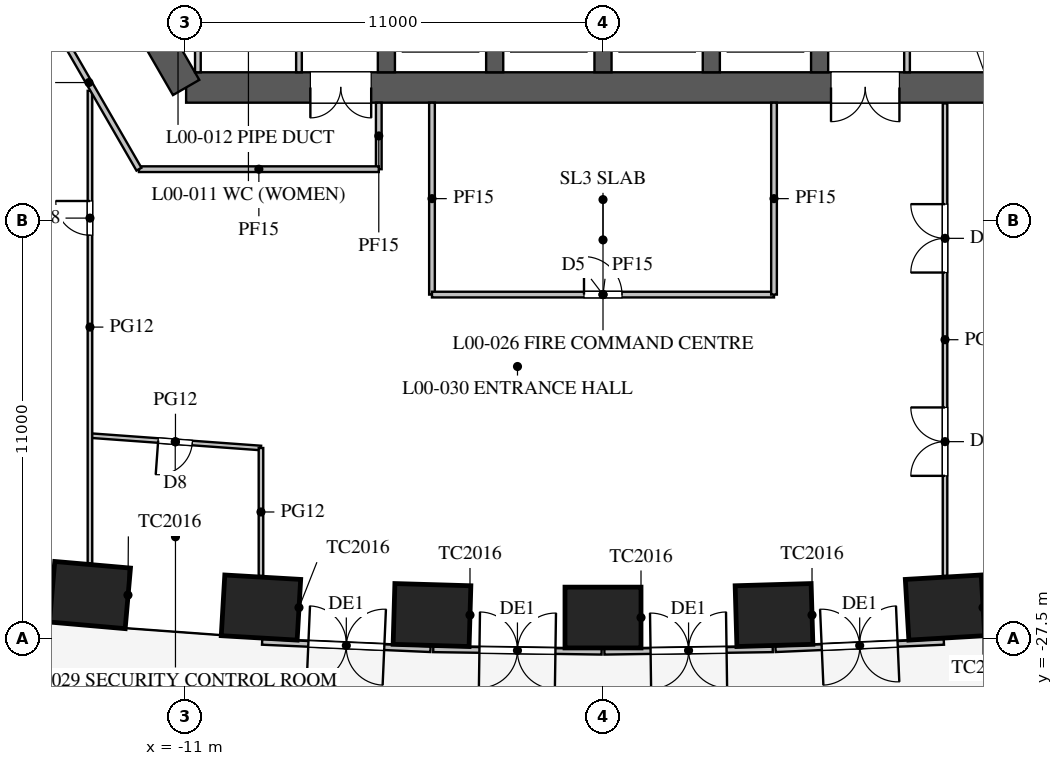
"""IFC4 building model, lengths in metres.
Left out: names, types, materials, properties, quantities, classifications, styles, units other than length and angle.
Written with IfcOpenShell. Run it as: python <this file> out.ifc"""

import sys

from ifc_helpers import new_model, si_unit, direction, frame, frame_2d, origin, origin_2d, place, context, subcontext, project, spatial, rectangle, extrude, element, fill, save


model = new_model("IFC4")
c1 = context("Model", 3, precision=1e-05, world=origin(), true_north=direction((0.0, 1.0)))
c2 = subcontext(c1, "Body", "Model", "MODEL_VIEW")
j1 = project(units=[si_unit("LENGTHUNIT", "METRE"), si_unit("PLANEANGLEUNIT", "RADIAN")], contexts=[c1])
p1 = place(None, origin())
s1 = spatial("IfcSite", under=j1, at=p1, CompositionType="ELEMENT")
p2 = place(p1, origin())
s2 = spatial("IfcBuilding", under=s1, at=p2, CompositionType="ELEMENT")
p3 = place(p2, origin())
s3 = spatial("IfcBuildingStorey", under=s2, at=p3, CompositionType="ELEMENT", Elevation=0.0)
for number, where, z_axis, x_axis in (
    (1, (-13.5, -26.357, 0.0), (0.0, 0.0, 1.0), (0.996, -0.087, 0.0)),
    (2, (-9.0, -26.686, 0.0), (0.0, 0.0, 1.0), (0.998, -0.058, 0.0)),
    (3, (-4.5, -26.883, 0.0), (0.0, 0.0, 1.0), (1.0, -0.029, 0.0)),
    (4, (0.0, -26.949, 0.0), (0.0, 0.0, 1.0), (1.0, 0.0, 0.0)),
    (5, (4.5, -26.883, 0.0), (0.0, 0.0, 1.0), (1.0, 0.029, 0.0)),
    (6, (9.0, -26.686, 0.0), (0.0, 0.0, 1.0), (0.998, 0.058, 0.0)),
):
    element("IfcColumn", number, at=place(p3, frame(where, z_axis=z_axis, x_axis=x_axis)), inside=s3, PredefinedType="COLUMN", context=c2, shape_type="SweptSolid", body=[
        extrude(rectangle(XDim=2.0, YDim=1.6, at=origin_2d()), origin(), (0.0, 0.0, 1.0), 6.5),
    ])
p4 = place(p3, frame((-10.97, -13.0, 0.0), z_axis=(0.0, 0.0, 1.0), x_axis=(1.0, 0.0, 0.0)))
e7 = element("IfcWall", 7, at=p4, inside=s3, PredefinedType="SHEAR", context=c2, shape_type="SweptSolid", body=[
    extrude(rectangle(XDim=21.939, YDim=0.8, at=frame_2d((10.97, 0.0))), origin(), (0.0, 0.0, 1.0), 6.5),
])
p5 = place(p4, frame((16.97, 0.0, 0.0)))
e8 = element("IfcOpeningElement", 8, at=p5, cuts=e7, PredefinedType="OPENING", context=c2, shape_type="SweptSolid", body=[
    extrude(rectangle(XDim=1.8, YDim=2.1, at=frame_2d((0.9, 1.05))), frame((0.0, 0.41, 0.0), z_axis=(0.0, -1.0, 0.0), x_axis=(1.0, 0.0, 0.0)), (0.0, 0.0, 1.0), 0.82),
])
p6 = place(p4, frame((3.27, 0.0, 0.0)))
e9 = element("IfcOpeningElement", 9, at=p6, cuts=e7, PredefinedType="OPENING", context=c2, shape_type="SweptSolid", body=[
    extrude(rectangle(XDim=1.6, YDim=2.1, at=frame_2d((0.8, 1.05))), frame((0.0, 0.41, 0.0), z_axis=(0.0, -1.0, 0.0), x_axis=(1.0, 0.0, 0.0)), (0.0, 0.0, 1.0), 0.82),
])
p7 = place(p3, frame((-16.743, -3.0, 0.0), z_axis=(0.0, 0.0, 1.0), x_axis=(0.499995765644, -0.866027848477, 0.0)))
e10 = element("IfcWall", 10, at=p7, inside=s3, PredefinedType="SHEAR", context=c2, shape_type="SweptSolid", body=[
    extrude(rectangle(XDim=11.547, YDim=0.8, at=frame_2d((5.773, 0.0))), origin(), (0.0, 0.0, 1.0), 6.5),
])
for number, where, z_axis, x_axis in (
    (11, (-5.7, -10.025, 0.0), (0.0, 0.0, 1.0), (0.0, -1.0, 0.0)),
    (12, (-2.85, -10.025, 0.0), (0.0, 0.0, 1.0), (0.0, -1.0, 0.0)),
    (13, (0.0, -10.025, 0.0), (0.0, 0.0, 1.0), (0.0, -1.0, 0.0)),
    (14, (2.85, -10.025, 0.0), (0.0, 0.0, 1.0), (0.0, -1.0, 0.0)),
    (15, (5.7, -10.025, 0.0), (0.0, 0.0, 1.0), (0.0, -1.0, 0.0)),
):
    element("IfcWall", number, at=place(p3, frame(where, z_axis=z_axis, x_axis=x_axis)), inside=s3, PredefinedType="SHEAR", context=c2, shape_type="SweptSolid", body=[
        extrude(rectangle(XDim=2.575, YDim=0.45, at=frame_2d((1.288, 0.0))), origin(), (0.0, 0.0, 1.0), 6.5),
    ])
p8 = place(p3, frame((-8.969, -27.589, 0.0), z_axis=(0.0, 0.0, 1.0), x_axis=(0.999053663589, -0.043494565978, 0.0)))
e16 = element("IfcWall", 16, at=p8, inside=s3, PredefinedType="SOLIDWALL", context=c2, shape_type="SweptSolid", body=[
    extrude(rectangle(XDim=4.434, YDim=0.15, at=frame_2d((2.217, 0.0))), origin(), (0.0, 0.0, 1.0), 6.48),
])
p9 = place(p8, frame((1.217, 0.0, 0.0)))
e17 = element("IfcOpeningElement", 17, at=p9, cuts=e16, PredefinedType="OPENING", context=c2, shape_type="SweptSolid", body=[
    extrude(rectangle(XDim=2.0, YDim=3.0, at=frame_2d((1.0, 1.5))), frame((0.0, 0.085, 0.0), z_axis=(0.0, -1.0, 0.0), x_axis=(1.0, 0.0, 0.0)), (0.0, 0.0, 1.0), 0.17),
])
p10 = place(p3, frame((-4.467, -27.784, 0.0), z_axis=(0.0, 0.0, 1.0), x_axis=(0.999894985015, -0.014492030258, 0.0)))
e18 = element("IfcWall", 18, at=p10, inside=s3, PredefinedType="SOLIDWALL", context=c2, shape_type="SweptSolid", body=[
    extrude(rectangle(XDim=4.431, YDim=0.15, at=frame_2d((2.215, 0.0))), origin(), (0.0, 0.0, 1.0), 6.48),
])
p11 = place(p10, frame((1.215, 0.0, 0.0)))
e19 = element("IfcOpeningElement", 19, at=p11, cuts=e18, PredefinedType="OPENING", context=c2, shape_type="SweptSolid", body=[
    extrude(rectangle(XDim=2.0, YDim=3.0, at=frame_2d((1.0, 1.5))), frame((0.0, 0.085, 0.0), z_axis=(0.0, -1.0, 0.0), x_axis=(1.0, 0.0, 0.0)), (0.0, 0.0, 1.0), 0.17),
])
p12 = place(p3, frame((0.036, -27.848, 0.0), z_axis=(0.0, 0.0, 1.0), x_axis=(0.999894985015, 0.014492030258, 0.0)))
e20 = element("IfcWall", 20, at=p12, inside=s3, PredefinedType="SOLIDWALL", context=c2, shape_type="SweptSolid", body=[
    extrude(rectangle(XDim=4.431, YDim=0.15, at=frame_2d((2.215, 0.0))), origin(), (0.0, 0.0, 1.0), 6.48),
])
p13 = place(p12, frame((1.215, 0.0, 0.0)))
e21 = element("IfcOpeningElement", 21, at=p13, cuts=e20, PredefinedType="OPENING", context=c2, shape_type="SweptSolid", body=[
    extrude(rectangle(XDim=2.0, YDim=3.0, at=frame_2d((1.0, 1.5))), frame((0.0, 0.085, 0.0), z_axis=(0.0, -1.0, 0.0), x_axis=(1.0, 0.0, 0.0)), (0.0, 0.0, 1.0), 0.17),
])
p14 = place(p3, frame((4.539, -27.782, 0.0), z_axis=(0.0, 0.0, 1.0), x_axis=(0.999053663589, 0.043494565978, 0.0)))
e22 = element("IfcWall", 22, at=p14, inside=s3, PredefinedType="SOLIDWALL", context=c2, shape_type="SweptSolid", body=[
    extrude(rectangle(XDim=4.434, YDim=0.15, at=frame_2d((2.217, 0.0))), origin(), (0.0, 0.0, 1.0), 6.48),
])
p15 = place(p14, frame((1.217, 0.0, 0.0)))
e23 = element("IfcOpeningElement", 23, at=p15, cuts=e22, PredefinedType="OPENING", context=c2, shape_type="SweptSolid", body=[
    extrude(rectangle(XDim=2.0, YDim=3.0, at=frame_2d((1.0, 1.5))), frame((0.0, 0.085, 0.0), z_axis=(0.0, -1.0, 0.0), x_axis=(1.0, 0.0, 0.0)), (0.0, 0.0, 1.0), 0.17),
])
p16 = place(p3, frame((8.0, -7.5, 0.0), z_axis=(0.0, 0.0, 1.0), x_axis=(0.0, -1.0, 0.0)))
e24 = element("IfcWall", 24, at=p16, inside=s3, PredefinedType="PARTITIONING", context=c2, shape_type="SweptSolid", body=[
    extrude(rectangle(XDim=5.1, YDim=0.15, at=frame_2d((2.55, 0.0))), origin(), (0.0, 0.0, 1.0), 6.3),
])
p17 = place(p16, frame((1.3, 0.0, 0.0)))
e25 = element("IfcOpeningElement", 25, at=p17, cuts=e24, PredefinedType="OPENING", context=c2, shape_type="SweptSolid", body=[
    extrude(rectangle(XDim=0.9, YDim=2.1, at=frame_2d((0.45, 1.05))), frame((0.0, 0.085, 0.0), z_axis=(0.0, -1.0, 0.0), x_axis=(1.0, 0.0, 0.0)), (0.0, 0.0, 1.0), 0.17),
])
p18 = place(p3, frame((-8.0, -7.5, 0.0), z_axis=(0.0, 0.0, 1.0), x_axis=(0.0, -1.0, 0.0)))
e26 = element("IfcWall", 26, at=p18, inside=s3, PredefinedType="PARTITIONING", context=c2, shape_type="SweptSolid", body=[
    extrude(rectangle(XDim=5.1, YDim=0.15, at=frame_2d((2.55, 0.0))), origin(), (0.0, 0.0, 1.0), 6.3),
])
p19 = place(p18, frame((2.6, 0.0, 0.0)))
e27 = element("IfcOpeningElement", 27, at=p19, cuts=e26, PredefinedType="OPENING", context=c2, shape_type="SweptSolid", body=[
    extrude(rectangle(XDim=0.9, YDim=2.1, at=frame_2d((0.45, 1.05))), frame((0.0, 0.085, 0.0), z_axis=(0.0, -1.0, 0.0), x_axis=(1.0, 0.0, 0.0)), (0.0, 0.0, 1.0), 0.17),
])
p20 = place(p3, frame((-10.66, -8.5, 0.0), z_axis=(0.0, 0.0, 1.0), x_axis=(0.0, -1.0, 0.0)))
e28 = element("IfcWall", 28, at=p20, inside=s3, PredefinedType="PARTITIONING", context=c2, shape_type="SweptSolid", body=[
    extrude(rectangle(XDim=4.1, YDim=0.15, at=frame_2d((2.05, 0.0))), origin(), (0.0, 0.0, 1.0), 6.3),
])
p21 = place(p3, frame((-14.203, -8.2, 0.0), z_axis=(0.0, 0.0, 1.0), x_axis=(-0.866024965723, -0.500000758745, 0.0)))
e29 = element("IfcWall", 29, at=p21, inside=s3, PredefinedType="PARTITIONING", context=c2, shape_type="SweptSolid", body=[
    extrude(rectangle(XDim=18.25, YDim=0.15, at=frame_2d((9.125, 0.0))), origin(), (0.0, 0.0, 1.0), 4.6),
])
p22 = place(p3, frame((-13.5, -22.16, 0.0), z_axis=(0.0, 0.0, 1.0), x_axis=(0.997363894896, -0.072562119306, 0.0)))
e30 = element("IfcWall", 30, at=p22, inside=s3, PredefinedType="PARTITIONING", context=c2, shape_type="SweptSolid", body=[
    extrude(rectangle(XDim=4.512, YDim=0.12, at=frame_2d((2.256, 0.0))), origin(), (0.0, 0.0, 1.0), 5.0),
])
p23 = place(p22, frame((1.8, 0.0, 0.0)))
e31 = element("IfcOpeningElement", 31, at=p23, cuts=e30, PredefinedType="OPENING", context=c2, shape_type="SweptSolid", body=[
    extrude(rectangle(XDim=0.9, YDim=2.1, at=frame_2d((0.45, 1.05))), frame((0.0, 0.07, 0.0), z_axis=(0.0, -1.0, 0.0), x_axis=(1.0, 0.0, 0.0)), (0.0, 0.0, 1.0), 0.14),
])
p24 = place(p3, frame((9.0, -13.42, 0.0), z_axis=(0.0, 0.0, 1.0), x_axis=(0.0, -1.0, 0.0)))
e32 = element("IfcWall", 32, at=p24, inside=s3, PredefinedType="PARTITIONING", context=c2, shape_type="SweptSolid", body=[
    extrude(rectangle(XDim=12.435, YDim=0.12, at=frame_2d((6.217, 0.0))), origin(), (0.0, 0.0, 1.0), 5.0),
])
p25 = place(p24, frame((2.65, 0.0, 0.0)))
e33 = element("IfcOpeningElement", 33, at=p25, cuts=e32, PredefinedType="OPENING", context=c2, shape_type="SweptSolid", body=[
    extrude(rectangle(XDim=1.8, YDim=2.1, at=frame_2d((0.9, 1.05))), frame((0.0, 0.07, 0.0), z_axis=(0.0, -1.0, 0.0), x_axis=(1.0, 0.0, 0.0)), (0.0, 0.0, 1.0), 0.14),
])
p26 = place(p24, frame((8.0, 0.0, 0.0)))
e34 = element("IfcOpeningElement", 34, at=p26, cuts=e32, PredefinedType="OPENING", context=c2, shape_type="SweptSolid", body=[
    extrude(rectangle(XDim=1.8, YDim=2.1, at=frame_2d((0.9, 1.05))), frame((0.0, 0.07, 0.0), z_axis=(0.0, -1.0, 0.0), x_axis=(1.0, 0.0, 0.0)), (0.0, 0.0, 1.0), 0.14),
])
p27 = place(p3, frame((-13.5, -13.087, 0.0), z_axis=(0.0, 0.0, 1.0), x_axis=(0.0, -1.0, 0.0)))
e35 = element("IfcWall", 35, at=p27, inside=s3, PredefinedType="PARTITIONING", context=c2, shape_type="SweptSolid", body=[
    extrude(rectangle(XDim=12.437, YDim=0.12, at=frame_2d((6.218, 0.0))), origin(), (0.0, 0.0, 1.0), 5.0),
])
p28 = place(p27, frame((2.9, 0.0, 0.0)))
e36 = element("IfcOpeningElement", 36, at=p28, cuts=e35, PredefinedType="OPENING", context=c2, shape_type="SweptSolid", body=[
    extrude(rectangle(XDim=0.9, YDim=2.1, at=frame_2d((0.45, 1.05))), frame((0.0, 0.07, 0.0), z_axis=(0.0, -1.0, 0.0), x_axis=(1.0, 0.0, 0.0)), (0.0, 0.0, 1.0), 0.14),
])
p29 = place(p3, frame((-9.0, -22.487, 0.0), z_axis=(0.0, 0.0, 1.0), x_axis=(0.0, -1.0, 0.0)))
e37 = element("IfcWall", 37, at=p29, inside=s3, PredefinedType="PARTITIONING", context=c2, shape_type="SweptSolid", body=[
    extrude(rectangle(XDim=3.367, YDim=0.12, at=frame_2d((1.684, 0.0))), origin(), (0.0, 0.0, 1.0), 5.0),
])
p30 = place(p3, frame((-4.5, -13.4, 0.0), z_axis=(0.0, 0.0, 1.0), x_axis=(0.0, -1.0, 0.0)))
e38 = element("IfcWall", 38, at=p30, inside=s3, PredefinedType="PARTITIONING", context=c2, shape_type="SweptSolid", body=[
    extrude(rectangle(XDim=5.05, YDim=0.15, at=frame_2d((2.525, 0.0))), origin(), (0.0, 0.0, 1.0), 5.4),
])
p31 = place(p3, frame((-4.5, -18.45, 0.0), z_axis=(0.0, 0.0, 1.0), x_axis=(1.0, 0.0, 0.0)))
e39 = element("IfcWall", 39, at=p31, inside=s3, PredefinedType="PARTITIONING", context=c2, shape_type="SweptSolid", body=[
    extrude(rectangle(XDim=9.0, YDim=0.15, at=frame_2d((4.5, 0.0))), origin(), (0.0, 0.0, 1.0), 6.3),
])
p32 = place(p31, frame((4.0, 0.0, 0.0)))
e40 = element("IfcOpeningElement", 40, at=p32, cuts=e39, PredefinedType="OPENING", context=c2, shape_type="SweptSolid", body=[
    extrude(rectangle(XDim=1.0, YDim=2.1, at=frame_2d((0.5, 1.05))), frame((0.0, 0.085, 0.0), z_axis=(0.0, -1.0, 0.0), x_axis=(1.0, 0.0, 0.0)), (0.0, 0.0, 1.0), 0.17),
])
p33 = place(p3, frame((4.5, -18.45, 0.0), z_axis=(0.0, 0.0, 1.0), x_axis=(0.0, 1.0, 0.0)))
e41 = element("IfcWall", 41, at=p33, inside=s3, PredefinedType="PARTITIONING", context=c2, shape_type="SweptSolid", body=[
    extrude(rectangle(XDim=5.05, YDim=0.15, at=frame_2d((2.525, 0.0))), origin(), (0.0, 0.0, 1.0), 5.4),
])
p34 = place(p3, frame((-5.9, -13.4, 0.0), z_axis=(0.0, 0.0, 1.0), x_axis=(0.0, -1.0, 0.0)))
e42 = element("IfcWall", 42, at=p34, inside=s3, PredefinedType="PARTITIONING", context=c2, shape_type="SweptSolid", body=[
    extrude(rectangle(XDim=1.75, YDim=0.15, at=frame_2d((0.875, 0.0))), origin(), (0.0, 0.0, 1.0), 6.3),
])
p35 = place(p3, frame((-5.9, -15.15, 0.0), z_axis=(0.0, 0.0, 1.0), x_axis=(-1.0, 0.0, 0.0)))
e43 = element("IfcWall", 43, at=p35, inside=s3, PredefinedType="PARTITIONING", context=c2, shape_type="SweptSolid", body=[
    extrude(rectangle(XDim=6.311, YDim=0.15, at=frame_2d((3.156, 0.0))), origin(), (0.0, 0.0, 1.0), 6.3),
])
p36 = place(p3, frame((-12.211, -15.15, 0.0), z_axis=(0.0, 0.0, 1.0), x_axis=(-0.499999433879, 0.866025730634, 0.0)))
e44 = element("IfcWall", 44, at=p36, inside=s3, PredefinedType="PARTITIONING", context=c2, shape_type="SweptSolid", body=[
    extrude(rectangle(XDim=5.265, YDim=0.15, at=frame_2d((2.632, 0.0))), origin(), (0.0, 0.0, 1.0), 6.3),
])
p37 = place(p9, origin())
e45 = element("IfcDoor", 45, at=p37, inside=s3, OperationType="DOUBLE_DOOR_DOUBLE_SWING", PredefinedType="DOOR", context=c2, shape_type="SweptSolid", body=[
    extrude(rectangle(XDim=2.0, YDim=3.0, at=frame_2d((1.0, 1.5))), frame((0.0, 0.025, 0.0), z_axis=(0.0, -1.0, 0.0), x_axis=(1.0, 0.0, 0.0)), (0.0, 0.0, 1.0), 0.05),
])
fill(e17, e45)
p38 = place(p11, origin())
e46 = element("IfcDoor", 46, at=p38, inside=s3, OperationType="DOUBLE_DOOR_DOUBLE_SWING", PredefinedType="DOOR", context=c2, shape_type="SweptSolid", body=[
    extrude(rectangle(XDim=2.0, YDim=3.0, at=frame_2d((1.0, 1.5))), frame((0.0, 0.025, 0.0), z_axis=(0.0, -1.0, 0.0), x_axis=(1.0, 0.0, 0.0)), (0.0, 0.0, 1.0), 0.05),
])
fill(e19, e46)
p39 = place(p13, origin())
e47 = element("IfcDoor", 47, at=p39, inside=s3, OperationType="DOUBLE_DOOR_DOUBLE_SWING", PredefinedType="DOOR", context=c2, shape_type="SweptSolid", body=[
    extrude(rectangle(XDim=2.0, YDim=3.0, at=frame_2d((1.0, 1.5))), frame((0.0, 0.025, 0.0), z_axis=(0.0, -1.0, 0.0), x_axis=(1.0, 0.0, 0.0)), (0.0, 0.0, 1.0), 0.05),
])
fill(e21, e47)
p40 = place(p15, origin())
e48 = element("IfcDoor", 48, at=p40, inside=s3, OperationType="DOUBLE_DOOR_DOUBLE_SWING", PredefinedType="DOOR", context=c2, shape_type="SweptSolid", body=[
    extrude(rectangle(XDim=2.0, YDim=3.0, at=frame_2d((1.0, 1.5))), frame((0.0, 0.025, 0.0), z_axis=(0.0, -1.0, 0.0), x_axis=(1.0, 0.0, 0.0)), (0.0, 0.0, 1.0), 0.05),
])
fill(e23, e48)
p41 = place(p5, frame((1.8, 0.0, 0.0), z_axis=(0.0, 0.0, 1.0), x_axis=(-1.0, 0.0, 0.0)))
e49 = element("IfcDoor", 49, at=p41, inside=s3, OperationType="DOUBLE_DOOR_SINGLE_SWING", PredefinedType="DOOR", context=c2, shape_type="SweptSolid", body=[
    extrude(rectangle(XDim=1.8, YDim=2.1, at=frame_2d((0.9, 1.05))), frame((0.0, 0.025, 0.0), z_axis=(0.0, -1.0, 0.0), x_axis=(1.0, 0.0, 0.0)), (0.0, 0.0, 1.0), 0.05),
])
fill(e8, e49)
p42 = place(p6, frame((1.6, 0.0, 0.0), z_axis=(0.0, 0.0, 1.0), x_axis=(-1.0, 0.0, 0.0)))
e50 = element("IfcDoor", 50, at=p42, inside=s3, OperationType="DOUBLE_DOOR_SINGLE_SWING", PredefinedType="DOOR", context=c2, shape_type="SweptSolid", body=[
    extrude(rectangle(XDim=1.6, YDim=2.1, at=frame_2d((0.8, 1.05))), frame((0.0, 0.025, 0.0), z_axis=(0.0, -1.0, 0.0), x_axis=(1.0, 0.0, 0.0)), (0.0, 0.0, 1.0), 0.05),
])
fill(e9, e50)
p43 = place(p25, frame((1.8, 0.0, 0.0), z_axis=(0.0, 0.0, 1.0), x_axis=(-1.0, 0.0, 0.0)))
e51 = element("IfcDoor", 51, at=p43, inside=s3, OperationType="DOUBLE_DOOR_SINGLE_SWING", PredefinedType="DOOR", context=c2, shape_type="SweptSolid", body=[
    extrude(rectangle(XDim=1.8, YDim=2.1, at=frame_2d((0.9, 1.05))), frame((0.0, 0.025, 0.0), z_axis=(0.0, -1.0, 0.0), x_axis=(1.0, 0.0, 0.0)), (0.0, 0.0, 1.0), 0.05),
])
fill(e33, e51)
p44 = place(p26, frame((1.8, 0.0, 0.0), z_axis=(0.0, 0.0, 1.0), x_axis=(-1.0, 0.0, 0.0)))
e52 = element("IfcDoor", 52, at=p44, inside=s3, OperationType="DOUBLE_DOOR_SINGLE_SWING", PredefinedType="DOOR", context=c2, shape_type="SweptSolid", body=[
    extrude(rectangle(XDim=1.8, YDim=2.1, at=frame_2d((0.9, 1.05))), frame((0.0, 0.025, 0.0), z_axis=(0.0, -1.0, 0.0), x_axis=(1.0, 0.0, 0.0)), (0.0, 0.0, 1.0), 0.05),
])
fill(e34, e52)
p45 = place(p28, frame((0.9, 0.0, 0.0), z_axis=(0.0, 0.0, 1.0), x_axis=(-1.0, 0.0, 0.0)))
e53 = element("IfcDoor", 53, at=p45, inside=s3, OperationType="SINGLE_SWING_RIGHT", PredefinedType="DOOR", context=c2, shape_type="SweptSolid", body=[
    extrude(rectangle(XDim=0.9, YDim=2.1, at=frame_2d((0.45, 1.05))), frame((0.0, 0.025, 0.0), z_axis=(0.0, -1.0, 0.0), x_axis=(1.0, 0.0, 0.0)), (0.0, 0.0, 1.0), 0.05),
])
fill(e36, e53)
p46 = place(p23, frame((0.9, 0.0, 0.0), z_axis=(0.0, 0.0, 1.0), x_axis=(-1.0, 0.0, 0.0)))
e54 = element("IfcDoor", 54, at=p46, inside=s3, OperationType="SINGLE_SWING_RIGHT", PredefinedType="DOOR", context=c2, shape_type="SweptSolid", body=[
    extrude(rectangle(XDim=0.9, YDim=2.1, at=frame_2d((0.45, 1.05))), frame((0.0, 0.025, 0.0), z_axis=(0.0, -1.0, 0.0), x_axis=(1.0, 0.0, 0.0)), (0.0, 0.0, 1.0), 0.05),
])
fill(e31, e54)
p47 = place(p32, origin())
e55 = element("IfcDoor", 55, at=p47, inside=s3, OperationType="SINGLE_SWING_LEFT", PredefinedType="DOOR", context=c2, shape_type="SweptSolid", body=[
    extrude(rectangle(XDim=1.0, YDim=2.1, at=frame_2d((0.5, 1.05))), frame((0.0, 0.025, 0.0), z_axis=(0.0, -1.0, 0.0), x_axis=(1.0, 0.0, 0.0)), (0.0, 0.0, 1.0), 0.05),
])
fill(e40, e55)
save(model, sys.argv[1])
